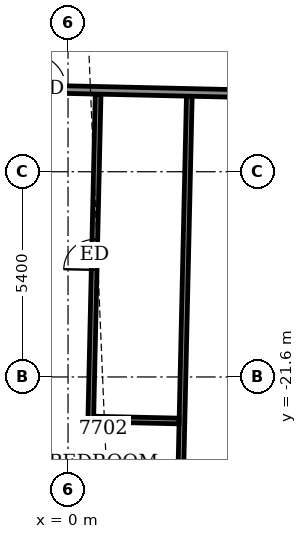
"""IFC4 building model, lengths in metres.
Left out: names, types, materials, properties, quantities, classifications, styles, units other than length and angle.
Written with IfcOpenShell. Run it as: python <this file> out.ifc"""

import sys

from ifc_helpers import new_model, si_unit, direction, frame, frame_2d, origin, place, context, subcontext, project, spatial, rectangle, extrude, element, fill, save


model = new_model("IFC4")
c1 = context("Model", 3, precision=1e-05, world=origin(), true_north=direction((0.0, 1.0)))
c2 = subcontext(c1, "Body", "Model", "MODEL_VIEW")
j1 = project(units=[si_unit("LENGTHUNIT", "METRE"), si_unit("PLANEANGLEUNIT", "RADIAN")], contexts=[c1])
p1 = place(None, origin())
s1 = spatial("IfcSite", under=j1, at=p1, CompositionType="ELEMENT")
p2 = place(p1, origin())
s2 = spatial("IfcBuilding", under=s1, at=p2, CompositionType="ELEMENT")
p3 = place(p2, frame((0.0, 0.0, 301.5)))
s3 = spatial("IfcBuildingStorey", under=s2, at=p3, CompositionType="ELEMENT", Elevation=301.5)
p4 = place(p3, frame((2.932, -25.66, 0.0), z_axis=(0.0, 0.0, 1.0), x_axis=(0.022623082162, 0.999744065325, 0.0)))
e1 = element("IfcWall", 1, at=p4, inside=s3, PredefinedType="PARTITIONING", context=c2, shape_type="SweptSolid", body=[
    extrude(rectangle(XDim=11.45, YDim=0.15, at=frame_2d((5.725, 0.0))), origin(), (0.0, 0.0, 1.0), 2.25),
])
p5 = place(p3, frame((0.598, -22.706, 0.0), z_axis=(0.0, 0.0, 1.0), x_axis=(0.99974031529, -0.022788198363, 0.0)))
e2 = element("IfcWall", 2, at=p5, inside=s3, PredefinedType="PARTITIONING", context=c2, shape_type="SweptSolid", body=[
    extrude(rectangle(XDim=2.325, YDim=0.15, at=frame_2d((1.162, 0.0))), origin(), (0.0, 0.0, 1.0), 2.75),
])
p6 = place(p3, frame((0.598, -22.706, 0.0), z_axis=(0.0, 0.0, 1.0), x_axis=(0.022700001308, 0.999742321771, 0.0)))
e3 = element("IfcWall", 3, at=p6, inside=s3, PredefinedType="PARTITIONING", context=c2, shape_type="SweptSolid", body=[
    extrude(rectangle(XDim=8.55, YDim=0.15, at=frame_2d((4.275, 0.0))), origin(), (0.0, 0.0, 1.0), 2.75),
])
p7 = place(p6, frame((3.925, 0.0, 0.0)))
e4 = element("IfcOpeningElement", 4, at=p7, cuts=e3, PredefinedType="OPENING", context=c2, shape_type="SweptSolid", body=[
    extrude(rectangle(XDim=0.8, YDim=2.1, at=frame_2d((0.4, 1.05))), frame((0.0, 0.085, 0.0), z_axis=(0.0, -1.0, 0.0), x_axis=(1.0, 0.0, 0.0)), (0.0, 0.0, 1.0), 0.17),
])
p8 = place(p3, frame((-27.058, -13.426, 0.0), z_axis=(0.0, 0.0, 1.0), x_axis=(0.999742445627, -0.022694545867, 0.0)))
e5 = element("IfcWall", 5, at=p8, inside=s3, PredefinedType="PARTITIONING", context=c2, shape_type="SweptSolid", body=[
    extrude(rectangle(XDim=54.509, YDim=0.2, at=frame_2d((27.255, 0.0))), origin(), (0.0, 0.0, 1.0), 2.15),
])
p9 = place(p8, frame((0.2, 0.0, 0.0)))
e6 = element("IfcOpeningElement", 6, at=p9, cuts=e5, PredefinedType="OPENING", context=c2, shape_type="SweptSolid", body=[
    extrude(rectangle(XDim=1.0, YDim=2.1, at=frame_2d((0.5, 1.05))), frame((0.0, 0.11, 0.0), z_axis=(0.0, -1.0, 0.0), x_axis=(1.0, 0.0, 0.0)), (0.0, 0.0, 1.0), 0.22),
])
p10 = place(p8, frame((4.809, 0.0, 0.0)))
e7 = element("IfcOpeningElement", 7, at=p10, cuts=e5, PredefinedType="OPENING", context=c2, shape_type="SweptSolid", body=[
    extrude(rectangle(XDim=0.9, YDim=2.1, at=frame_2d((0.45, 1.05))), frame((0.0, 0.11, 0.0), z_axis=(0.0, -1.0, 0.0), x_axis=(1.0, 0.0, 0.0)), (0.0, 0.0, 1.0), 0.22),
])
p11 = place(p8, frame((10.309, 0.0, 0.0)))
e8 = element("IfcOpeningElement", 8, at=p11, cuts=e5, PredefinedType="OPENING", context=c2, shape_type="SweptSolid", body=[
    extrude(rectangle(XDim=1.0, YDim=2.1, at=frame_2d((0.5, 1.05))), frame((0.0, 0.11, 0.0), z_axis=(0.0, -1.0, 0.0), x_axis=(1.0, 0.0, 0.0)), (0.0, 0.0, 1.0), 0.22),
])
p12 = place(p8, frame((7.309, 0.0, 0.0)))
e9 = element("IfcOpeningElement", 9, at=p12, cuts=e5, PredefinedType="OPENING", context=c2, shape_type="SweptSolid", body=[
    extrude(rectangle(XDim=0.9, YDim=2.1, at=frame_2d((0.45, 1.05))), frame((0.0, 0.11, 0.0), z_axis=(0.0, -1.0, 0.0), x_axis=(1.0, 0.0, 0.0)), (0.0, 0.0, 1.0), 0.22),
])
p13 = place(p8, frame((14.759, 0.0, 0.0)))
e10 = element("IfcOpeningElement", 10, at=p13, cuts=e5, PredefinedType="OPENING", context=c2, shape_type="SweptSolid", body=[
    extrude(rectangle(XDim=1.0, YDim=2.1, at=frame_2d((0.5, 1.05))), frame((0.0, 0.11, 0.0), z_axis=(0.0, -1.0, 0.0), x_axis=(1.0, 0.0, 0.0)), (0.0, 0.0, 1.0), 0.22),
])
p14 = place(p8, frame((18.609, 0.0, 0.0)))
e11 = element("IfcOpeningElement", 11, at=p14, cuts=e5, PredefinedType="OPENING", context=c2, shape_type="SweptSolid", body=[
    extrude(rectangle(XDim=0.9, YDim=2.1, at=frame_2d((0.45, 1.05))), frame((0.0, 0.11, 0.0), z_axis=(0.0, -1.0, 0.0), x_axis=(1.0, 0.0, 0.0)), (0.0, 0.0, 1.0), 0.22),
])
p15 = place(p8, frame((23.509, 0.0, 0.0)))
e12 = element("IfcOpeningElement", 12, at=p15, cuts=e5, PredefinedType="OPENING", context=c2, shape_type="SweptSolid", body=[
    extrude(rectangle(XDim=0.9, YDim=2.1, at=frame_2d((0.45, 1.05))), frame((0.0, 0.11, 0.0), z_axis=(0.0, -1.0, 0.0), x_axis=(1.0, 0.0, 0.0)), (0.0, 0.0, 1.0), 0.22),
])
p16 = place(p8, frame((26.109, 0.0, 0.0)))
e13 = element("IfcOpeningElement", 13, at=p16, cuts=e5, PredefinedType="OPENING", context=c2, shape_type="SweptSolid", body=[
    extrude(rectangle(XDim=0.9, YDim=2.1, at=frame_2d((0.45, 1.05))), frame((0.0, 0.11, 0.0), z_axis=(0.0, -1.0, 0.0), x_axis=(1.0, 0.0, 0.0)), (0.0, 0.0, 1.0), 0.22),
])
p17 = place(p8, frame((34.009, 0.0, 0.0)))
e14 = element("IfcOpeningElement", 14, at=p17, cuts=e5, PredefinedType="OPENING", context=c2, shape_type="SweptSolid", body=[
    extrude(rectangle(XDim=1.0, YDim=2.1, at=frame_2d((0.5, 1.05))), frame((0.0, 0.11, 0.0), z_axis=(0.0, -1.0, 0.0), x_axis=(1.0, 0.0, 0.0)), (0.0, 0.0, 1.0), 0.22),
])
p18 = place(p8, frame((41.234, 0.0, 0.0)))
e15 = element("IfcOpeningElement", 15, at=p18, cuts=e5, PredefinedType="OPENING", context=c2, shape_type="SweptSolid", body=[
    extrude(rectangle(XDim=1.0, YDim=2.1, at=frame_2d((0.5, 1.05))), frame((0.0, 0.11, 0.0), z_axis=(0.0, -1.0, 0.0), x_axis=(1.0, 0.0, 0.0)), (0.0, 0.0, 1.0), 0.22),
])
p19 = place(p8, frame((45.559, 0.0, 0.0)))
e16 = element("IfcOpeningElement", 16, at=p19, cuts=e5, PredefinedType="OPENING", context=c2, shape_type="SweptSolid", body=[
    extrude(rectangle(XDim=0.9, YDim=2.1, at=frame_2d((0.45, 1.05))), frame((0.0, 0.11, 0.0), z_axis=(0.0, -1.0, 0.0), x_axis=(1.0, 0.0, 0.0)), (0.0, 0.0, 1.0), 0.22),
])
p20 = place(p8, frame((50.587, 0.0, 0.0)))
e17 = element("IfcOpeningElement", 17, at=p20, cuts=e5, PredefinedType="OPENING", context=c2, shape_type="SweptSolid", body=[
    extrude(rectangle(XDim=1.0, YDim=2.1, at=frame_2d((0.5, 1.05))), frame((0.0, 0.11, 0.0), z_axis=(0.0, -1.0, 0.0), x_axis=(1.0, 0.0, 0.0)), (0.0, 0.0, 1.0), 0.22),
])
p21 = place(p16, origin())
e18 = element("IfcDoor", 18, at=p21, inside=s3, OperationType="SINGLE_SWING_RIGHT", PredefinedType="DOOR", context=c2, shape_type="SweptSolid", body=[
    extrude(rectangle(XDim=0.9, YDim=2.1, at=frame_2d((0.45, 1.05))), frame((0.0, 0.025, 0.0), z_axis=(0.0, -1.0, 0.0), x_axis=(1.0, 0.0, 0.0)), (0.0, 0.0, 1.0), 0.05),
])
fill(e13, e18)
p22 = place(p7, origin())
e19 = element("IfcDoor", 19, at=p22, inside=s3, OperationType="SINGLE_SWING_RIGHT", PredefinedType="DOOR", context=c2, shape_type="SweptSolid", body=[
    extrude(rectangle(XDim=0.8, YDim=2.1, at=frame_2d((0.4, 1.05))), frame((0.0, 0.025, 0.0), z_axis=(0.0, -1.0, 0.0), x_axis=(1.0, 0.0, 0.0)), (0.0, 0.0, 1.0), 0.05),
])
fill(e4, e19)
save(model, sys.argv[1])
